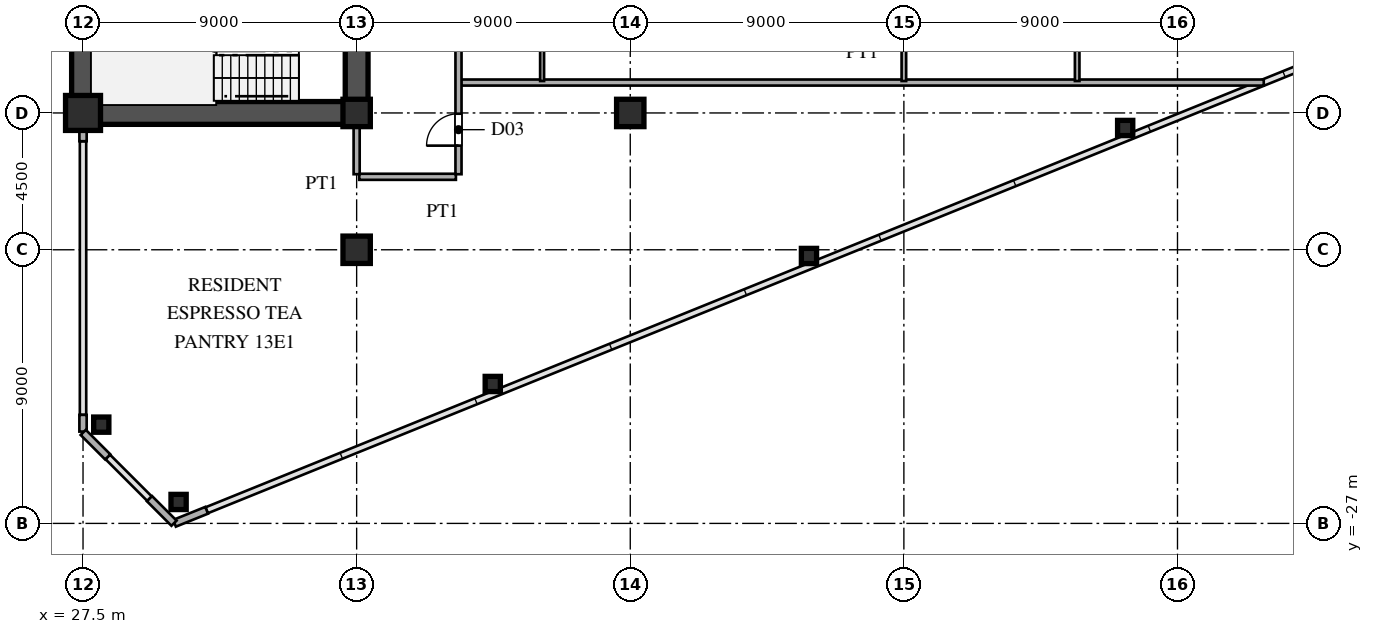
"""IFC4 building model, lengths in metres.
Left out: names, types, materials, properties, quantities, classifications, styles, units other than length and angle.
Written with IfcOpenShell. Run it as: python <this file> out.ifc"""

import sys

from ifc_helpers import new_model, si_unit, direction, frame, frame_2d, origin, origin_2d, place, context, subcontext, project, spatial, rectangle, hollow_rectangle, i_section, extrude, source, transform, mapped, element, fill, save


model = new_model("IFC4")
c1 = context("Model", 3, precision=1e-05, world=origin(), true_north=direction((0.0, 1.0)))
c2 = subcontext(c1, "Body", "Model", "MODEL_VIEW")
j1 = project(units=[si_unit("LENGTHUNIT", "METRE"), si_unit("PLANEANGLEUNIT", "RADIAN")], contexts=[c1])
p1 = place(None, origin())
s1 = spatial("IfcSite", under=j1, at=p1, CompositionType="ELEMENT")
p2 = place(p1, origin())
s2 = spatial("IfcBuilding", under=s1, at=p2, CompositionType="ELEMENT")
p3 = place(p2, frame((0.0, 0.0, 51.3)))
s3 = spatial("IfcBuildingStorey", under=s2, at=p3, CompositionType="ELEMENT", Elevation=51.3)
m1 = source(origin(), c2, "Body", "SweptSolid", [
    extrude(hollow_rectangle(XDim=1.15, YDim=1.15, WallThickness=0.048, at=origin_2d()), origin(), (0.0, 0.0, 1.0), 3.6),
])
p4 = place(p3, frame((27.5, -13.5, 0.0), z_axis=(0.0, 0.0, 1.0), x_axis=(1.0, 0.0, 0.0)))
e1 = element("IfcColumn", 1, at=p4, inside=s3, PredefinedType="COLUMN", context=c2, shape_type="MappedRepresentation", body=[
    mapped(m1, transform((0.0, 0.0, 0.0), scale=1.0)),
])
m2 = source(origin(), c2, "Body", "SweptSolid", [
    extrude(i_section(OverallWidth=0.9, OverallDepth=0.9, WebThickness=0.036, FlangeThickness=0.055, at=origin_2d()), origin(), (0.0, 0.0, 1.0), 3.6),
])
for number, where, z_axis, x_axis in (
    (2, (36.5, -18.0, 0.0), (0.0, 0.0, 1.0), (1.0, 0.0, 0.0)),
    (3, (36.5, -13.5, 0.0), (0.0, 0.0, 1.0), (1.0, 0.0, 0.0)),
    (4, (45.5, -13.5, 0.0), (0.0, 0.0, 1.0), (1.0, 0.0, 0.0)),
):
    element("IfcColumn", number, at=place(p3, frame(where, z_axis=z_axis, x_axis=x_axis)), inside=s3, PredefinedType="COLUMN", context=c2, shape_type="MappedRepresentation", body=[
        mapped(m2, transform((0.0, 0.0, 0.0), scale=1.0)),
    ])
m3 = source(origin(), c2, "Body", "SweptSolid", [
    extrude(hollow_rectangle(XDim=0.5, YDim=0.5, WallThickness=0.02, at=origin_2d()), origin(), (0.0, 0.0, 1.0), 3.6),
])
for number, where, z_axis, x_axis in (
    (5, (30.643, -26.295, 0.0), (0.0, 0.0, 1.0), (1.0, 0.0, 0.0)),
    (6, (28.1, -23.751, 0.0), (0.0, 0.0, 1.0), (1.0, 0.0, 0.0)),
    (7, (40.977, -22.414, 0.0), (0.0, 0.0, 1.0), (1.0, 0.0, 0.0)),
    (8, (51.378, -18.204, 0.0), (0.0, 0.0, 1.0), (1.0, 0.0, 0.0)),
    (9, (61.779, -13.994, 0.0), (0.0, 0.0, 1.0), (1.0, 0.0, 0.0)),
):
    element("IfcColumn", number, at=place(p3, frame(where, z_axis=z_axis, x_axis=x_axis)), inside=s3, PredefinedType="COLUMN", context=c2, shape_type="MappedRepresentation", body=[
        mapped(m3, transform((0.0, 0.0, 0.0), scale=1.0)),
    ])
p5 = place(p3, frame((30.509, -26.996, 0.0), z_axis=(0.0, 0.0, 1.0), x_axis=(0.927007103665, 0.375043770452, 0.0)))
e10 = element("IfcWall", 10, at=p5, inside=s3, PredefinedType="SOLIDWALL", context=c2, shape_type="SweptSolid", body=[
    extrude(rectangle(XDim=1.14, YDim=0.24, at=frame_2d((0.57, 0.0))), origin(), (0.0, 0.0, 1.0), 3.38),
])
p6 = place(p3, frame((27.5, -23.98, 0.0), z_axis=(0.0, 0.0, 1.0), x_axis=(0.0, 1.0, 0.0)))
e11 = element("IfcWall", 11, at=p6, inside=s3, PredefinedType="SOLIDWALL", context=c2, shape_type="SweptSolid", body=[
    extrude(rectangle(XDim=0.55, YDim=0.24, at=frame_2d((0.275, 0.0))), origin(), (0.0, 0.0, 1.0), 3.38),
])
p7 = place(p3, frame((27.5, -14.43, 0.0), z_axis=(0.0, 0.0, 1.0), x_axis=(0.0, 1.0, 0.0)))
e12 = element("IfcWall", 12, at=p7, inside=s3, PredefinedType="SOLIDWALL", context=c2, shape_type="SweptSolid", body=[
    extrude(rectangle(XDim=0.55, YDim=0.24, at=frame_2d((0.275, 0.0))), origin(), (0.0, 0.0, 1.0), 2.88),
])
for number, where, z_axis, x_axis in (
    (13, (27.507, -24.007, 0.0), (0.0, 0.0, 1.0), (0.707, -0.707, 0.0)),
    (14, (29.687, -26.187, 0.0), (0.0, 0.0, 1.0), (0.707, -0.707, 0.0)),
):
    element("IfcWall", number, at=place(p3, frame(where, z_axis=z_axis, x_axis=x_axis)), inside=s3, PredefinedType="SOLIDWALL", context=c2, shape_type="SweptSolid", body=[
        extrude(rectangle(XDim=1.14, YDim=0.24, at=frame_2d((0.57, 0.0))), origin(), (0.0, 0.0, 1.0), 3.38),
    ])
p8 = place(p3, frame((27.5, -13.5, 0.0), z_axis=(0.0, 0.0, 1.0), x_axis=(0.0, 1.0, 0.0)))
e15 = element("IfcWall", 15, at=p8, inside=s3, PredefinedType="SHEAR", context=c2, shape_type="SweptSolid", body=[
    extrude(rectangle(XDim=12.2, YDim=0.75, at=frame_2d((6.1, 0.0))), origin(), (0.0, 0.0, 1.0), 3.38),
])
p9 = place(p3, frame((27.5, -13.5, 0.0), z_axis=(0.0, 0.0, 1.0), x_axis=(1.0, 0.0, 0.0)))
e16 = element("IfcWall", 16, at=p9, inside=s3, PredefinedType="SHEAR", context=c2, shape_type="SweptSolid", body=[
    extrude(rectangle(XDim=9.0, YDim=0.75, at=frame_2d((4.5, 0.0))), origin(), (0.0, 0.0, 1.0), 3.38),
])
p10 = place(p3, frame((36.5, -13.65, 0.0), z_axis=(0.0, 0.0, 1.0), x_axis=(0.0, 1.0, 0.0)))
e17 = element("IfcWall", 17, at=p10, inside=s3, PredefinedType="SHEAR", context=c2, shape_type="SweptSolid", body=[
    extrude(rectangle(XDim=7.15, YDim=0.75, at=frame_2d((3.575, 0.0))), origin(), (0.0, 0.0, 1.0), 3.38),
])
p11 = place(p10, frame((4.675, 0.0, 0.0)))
e18 = element("IfcOpeningElement", 18, at=p11, cuts=e17, PredefinedType="OPENING", context=c2, shape_type="SweptSolid", body=[
    extrude(rectangle(XDim=1.15, YDim=2.2, at=frame_2d((0.575, 1.1))), frame((0.0, 0.385, 0.0), z_axis=(0.0, -1.0, 0.0), x_axis=(1.0, 0.0, 0.0)), (0.0, 0.0, 1.0), 0.77),
])
p12 = place(p3, frame((36.585, -15.6, 0.0), z_axis=(0.0, 0.0, 1.0), x_axis=(1.0, 0.0, 0.0)))
e19 = element("IfcWall", 19, at=p12, inside=s3, PredefinedType="PARTITIONING", context=c2, shape_type="SweptSolid", body=[
    extrude(rectangle(XDim=3.18, YDim=0.2, at=frame_2d((1.59, 0.0))), origin(), (0.0, 0.0, 1.0), 3.38),
])
p13 = place(p3, frame((39.93, -12.5, 0.0), z_axis=(0.0, 0.0, 1.0), x_axis=(1.0, 0.0, 0.0)))
e20 = element("IfcWall", 20, at=p13, inside=s3, PredefinedType="PARTITIONING", context=c2, shape_type="SweptSolid", body=[
    extrude(rectangle(XDim=26.407, YDim=0.2, at=frame_2d((13.204, 0.0))), origin(), (0.0, 0.0, 1.0), 3.38),
])
p14 = place(p3, frame((36.5, -15.515, 0.0), z_axis=(0.0, 0.0, 1.0), x_axis=(0.0, 1.0, 0.0)))
e21 = element("IfcWall", 21, at=p14, inside=s3, PredefinedType="PARTITIONING", context=c2, shape_type="SweptSolid", body=[
    extrude(rectangle(XDim=1.635, YDim=0.2, at=frame_2d((0.817, 0.0))), origin(), (0.0, 0.0, 1.0), 2.68),
])
p15 = place(p3, frame((39.85, -15.515, 0.0), z_axis=(0.0, 0.0, 1.0), x_axis=(0.0, 1.0, 0.0)))
e22 = element("IfcWall", 22, at=p15, inside=s3, PredefinedType="PARTITIONING", context=c2, shape_type="SweptSolid", body=[
    extrude(rectangle(XDim=31.03, YDim=0.2, at=frame_2d((15.515, 0.0))), origin(), (0.0, 0.0, 1.0), 3.38),
])
p16 = place(p15, frame((0.94, 0.0, 0.0)))
e23 = element("IfcOpeningElement", 23, at=p16, cuts=e22, PredefinedType="OPENING", context=c2, shape_type="SweptSolid", body=[
    extrude(rectangle(XDim=1.05, YDim=2.25, at=frame_2d((0.525, 1.125))), frame((0.0, 0.11, 0.0), z_axis=(0.0, -1.0, 0.0), x_axis=(1.0, 0.0, 0.0)), (0.0, 0.0, 1.0), 0.22),
])
p17 = place(p15, frame((9.28, 0.0, 0.0)))
e24 = element("IfcOpeningElement", 24, at=p17, cuts=e22, PredefinedType="OPENING", context=c2, shape_type="SweptSolid", body=[
    extrude(rectangle(XDim=1.05, YDim=2.25, at=frame_2d((0.525, 1.125))), frame((0.0, 0.11, 0.0), z_axis=(0.0, -1.0, 0.0), x_axis=(1.0, 0.0, 0.0)), (0.0, 0.0, 1.0), 0.22),
])
p18 = place(p15, frame((21.825, 0.0, 0.0)))
e25 = element("IfcOpeningElement", 25, at=p18, cuts=e22, PredefinedType="OPENING", context=c2, shape_type="SweptSolid", body=[
    extrude(rectangle(XDim=1.05, YDim=2.25, at=frame_2d((0.525, 1.125))), frame((0.0, 0.11, 0.0), z_axis=(0.0, -1.0, 0.0), x_axis=(1.0, 0.0, 0.0)), (0.0, 0.0, 1.0), 0.22),
])
p19 = place(p15, frame((29.04, 0.0, 0.0)))
e26 = element("IfcOpeningElement", 26, at=p19, cuts=e22, PredefinedType="OPENING", context=c2, shape_type="SweptSolid", body=[
    extrude(rectangle(XDim=1.05, YDim=2.25, at=frame_2d((0.525, 1.125))), frame((0.0, 0.11, 0.0), z_axis=(0.0, -1.0, 0.0), x_axis=(1.0, 0.0, 0.0)), (0.0, 0.0, 1.0), 0.22),
])
p20 = place(p3, frame((42.6, -12.45, 0.0), z_axis=(0.0, 0.0, 1.0), x_axis=(0.0, 1.0, 0.0)))
e27 = element("IfcWall", 27, at=p20, inside=s3, PredefinedType="PARTITIONING", context=c2, shape_type="SweptSolid", body=[
    extrude(rectangle(XDim=9.233, YDim=0.13, at=frame_2d((4.616, 0.0))), origin(), (0.0, 0.0, 1.0), 3.38),
])
p21 = place(p20, frame((6.475, 0.0, 0.0)))
e28 = element("IfcOpeningElement", 28, at=p21, cuts=e27, PredefinedType="OPENING", context=c2, shape_type="SweptSolid", body=[
    extrude(rectangle(XDim=0.95, YDim=2.15, at=frame_2d((0.475, 1.075))), frame((0.0, 0.075, 0.0), z_axis=(0.0, -1.0, 0.0), x_axis=(1.0, 0.0, 0.0)), (0.0, 0.0, 1.0), 0.15),
])
p22 = place(p3, frame((54.5, -12.45, 0.0), z_axis=(0.0, 0.0, 1.0), x_axis=(0.0, 1.0, 0.0)))
e29 = element("IfcWall", 29, at=p22, inside=s3, PredefinedType="PARTITIONING", context=c2, shape_type="SweptSolid", body=[
    extrude(rectangle(XDim=24.9, YDim=0.15, at=frame_2d((12.45, 0.0))), origin(), (0.0, 0.0, 1.0), 2.68),
])
p23 = place(p22, frame((6.475, 0.0, 0.0)))
e30 = element("IfcOpeningElement", 30, at=p23, cuts=e29, PredefinedType="OPENING", context=c2, shape_type="SweptSolid", body=[
    extrude(rectangle(XDim=0.95, YDim=2.15, at=frame_2d((0.475, 1.075))), frame((0.0, 0.085, 0.0), z_axis=(0.0, -1.0, 0.0), x_axis=(1.0, 0.0, 0.0)), (0.0, 0.0, 1.0), 0.17),
])
p24 = place(p22, frame((18.975, 0.0, 0.0)))
e31 = element("IfcOpeningElement", 31, at=p24, cuts=e29, PredefinedType="OPENING", context=c2, shape_type="SweptSolid", body=[
    extrude(rectangle(XDim=0.95, YDim=2.15, at=frame_2d((0.475, 1.075))), frame((0.0, 0.085, 0.0), z_axis=(0.0, -1.0, 0.0), x_axis=(1.0, 0.0, 0.0)), (0.0, 0.0, 1.0), 0.17),
])
p25 = place(p3, frame((60.2, -12.45, 0.0), z_axis=(0.0, 0.0, 1.0), x_axis=(0.0, 1.0, 0.0)))
e32 = element("IfcWall", 32, at=p25, inside=s3, PredefinedType="PARTITIONING", context=c2, shape_type="SweptSolid", body=[
    extrude(rectangle(XDim=24.9, YDim=0.15, at=frame_2d((12.45, 0.0))), origin(), (0.0, 0.0, 1.0), 3.38),
])
p26 = place(p25, frame((1.808, 0.0, 0.0)))
e33 = element("IfcOpeningElement", 33, at=p26, cuts=e32, PredefinedType="OPENING", context=c2, shape_type="SweptSolid", body=[
    extrude(rectangle(XDim=0.95, YDim=2.15, at=frame_2d((0.475, 1.075))), frame((0.0, 0.085, 0.0), z_axis=(0.0, -1.0, 0.0), x_axis=(1.0, 0.0, 0.0)), (0.0, 0.0, 1.0), 0.17),
])
p27 = place(p25, frame((6.475, 0.0, 0.0)))
e34 = element("IfcOpeningElement", 34, at=p27, cuts=e32, PredefinedType="OPENING", context=c2, shape_type="SweptSolid", body=[
    extrude(rectangle(XDim=0.95, YDim=2.15, at=frame_2d((0.475, 1.075))), frame((0.0, 0.085, 0.0), z_axis=(0.0, -1.0, 0.0), x_axis=(1.0, 0.0, 0.0)), (0.0, 0.0, 1.0), 0.17),
])
p28 = place(p25, frame((11.142, 0.0, 0.0)))
e35 = element("IfcOpeningElement", 35, at=p28, cuts=e32, PredefinedType="OPENING", context=c2, shape_type="SweptSolid", body=[
    extrude(rectangle(XDim=0.95, YDim=2.15, at=frame_2d((0.475, 1.075))), frame((0.0, 0.085, 0.0), z_axis=(0.0, -1.0, 0.0), x_axis=(1.0, 0.0, 0.0)), (0.0, 0.0, 1.0), 0.17),
])
p29 = place(p25, frame((15.308, 0.0, 0.0)))
e36 = element("IfcOpeningElement", 36, at=p29, cuts=e32, PredefinedType="OPENING", context=c2, shape_type="SweptSolid", body=[
    extrude(rectangle(XDim=0.95, YDim=2.15, at=frame_2d((0.475, 1.075))), frame((0.0, 0.085, 0.0), z_axis=(0.0, -1.0, 0.0), x_axis=(1.0, 0.0, 0.0)), (0.0, 0.0, 1.0), 0.17),
])
p30 = place(p25, frame((18.975, 0.0, 0.0)))
e37 = element("IfcOpeningElement", 37, at=p30, cuts=e32, PredefinedType="OPENING", context=c2, shape_type="SweptSolid", body=[
    extrude(rectangle(XDim=0.95, YDim=2.15, at=frame_2d((0.475, 1.075))), frame((0.0, 0.085, 0.0), z_axis=(0.0, -1.0, 0.0), x_axis=(1.0, 0.0, 0.0)), (0.0, 0.0, 1.0), 0.17),
])
m4 = source(origin(), c2, "Body", "SweptSolid", [
    extrude(rectangle(XDim=1.05, YDim=2.25, at=frame_2d((0.525, 1.125))), frame((0.0, 0.025, 0.0), z_axis=(0.0, -1.0, 0.0), x_axis=(1.0, 0.0, 0.0)), (0.0, 0.0, 1.0), 0.05),
])
p31 = place(p16, origin())
e38 = element("IfcDoor", 38, at=p31, inside=s3, OperationType="SINGLE_SWING_LEFT", PredefinedType="DOOR", context=c2, shape_type="MappedRepresentation", body=[
    mapped(m4, transform((0.0, 0.0, 0.0), scale=1.0)),
])
fill(e23, e38)
save(model, sys.argv[1])
